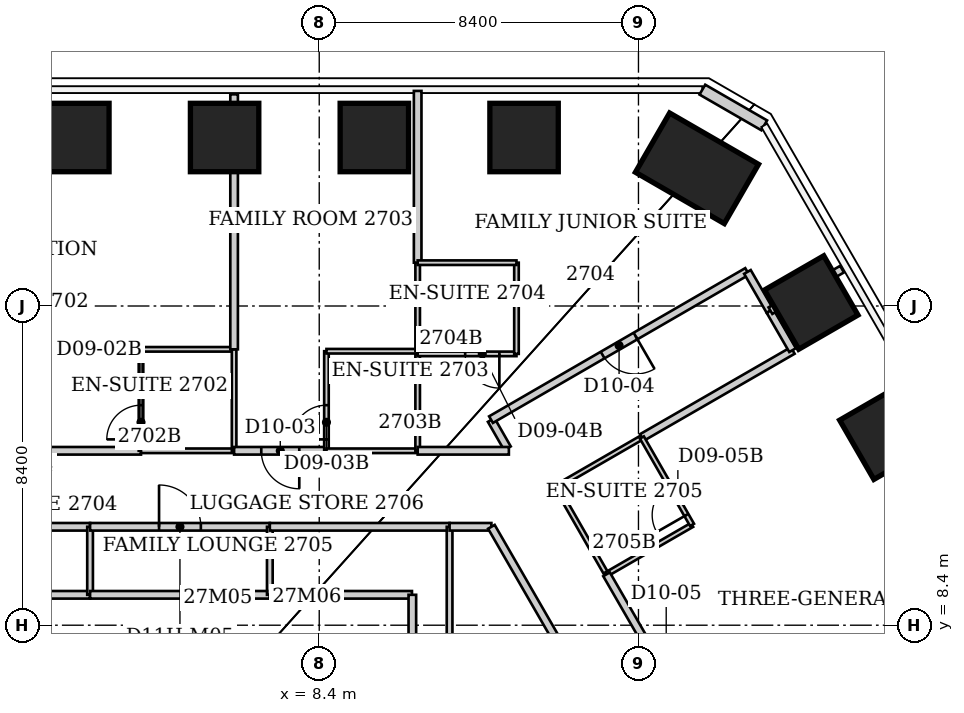
"""IFC4 building model, lengths in metres.
Left out: names, types, materials, properties, quantities, classifications, styles, units other than length and angle.
Written with IfcOpenShell. Run it as: python <this file> out.ifc"""

import sys

from ifc_helpers import new_model, si_unit, direction, frame, frame_2d, origin, origin_2d, place, context, subcontext, project, spatial, rectangle, extrude, element, fill, save


model = new_model("IFC4")
c1 = context("Model", 3, precision=1e-05, world=origin(), true_north=direction((0.0, 1.0)))
c2 = subcontext(c1, "Body", "Model", "MODEL_VIEW")
j1 = project(units=[si_unit("LENGTHUNIT", "METRE"), si_unit("PLANEANGLEUNIT", "RADIAN")], contexts=[c1])
p1 = place(None, origin())
s1 = spatial("IfcSite", under=j1, at=p1, CompositionType="ELEMENT")
p2 = place(p1, origin())
s2 = spatial("IfcBuilding", under=s1, at=p2, CompositionType="ELEMENT")
p3 = place(p2, frame((0.0, 0.0, 112.0)))
s3 = spatial("IfcBuildingStorey", under=s2, at=p3, CompositionType="ELEMENT", Elevation=112.0)
for number, where, z_axis, x_axis in (
    (1, (1.97, 21.234, 0.0), (0.0, 0.0, 1.0), (0.0, 1.0, 0.0)),
    (2, (5.91, 21.234, 0.0), (0.0, 0.0, 1.0), (0.0, 1.0, 0.0)),
    (3, (9.85, 21.234, 0.0), (0.0, 0.0, 1.0), (0.0, 1.0, 0.0)),
    (4, (13.79, 21.234, 0.0), (0.0, 0.0, 1.0), (0.0, 1.0, 0.0)),
):
    element("IfcColumn", number, at=place(p3, frame(where, z_axis=z_axis, x_axis=x_axis)), inside=s3, PredefinedType="COLUMN", context=c2, shape_type="SweptSolid", body=[
        extrude(rectangle(XDim=1.8, YDim=1.8, at=origin_2d()), origin(), (0.0, 0.0, 1.0), 3.8),
    ])
p4 = place(p3, frame((18.339, 20.424, 0.0), z_axis=(0.0, 0.0, 1.0), x_axis=(0.5, 0.866025403784, 0.0)))
e5 = element("IfcColumn", 5, at=p4, inside=s3, PredefinedType="COLUMN", context=c2, shape_type="SweptSolid", body=[
    extrude(rectangle(XDim=1.8, YDim=2.7, at=origin_2d()), origin(), (0.0, 0.0, 1.0), 3.8),
])
for number, where, z_axis, x_axis in (
    (6, (21.346, 16.891, 0.0), (0.0, 0.0, 1.0), (0.866, 0.5, 0.0)),
    (7, (23.324, 13.466, 0.0), (0.0, 0.0, 1.0), (0.866, 0.5, 0.0)),
):
    element("IfcColumn", number, at=place(p3, frame(where, z_axis=z_axis, x_axis=x_axis)), inside=s3, PredefinedType="COLUMN", context=c2, shape_type="SweptSolid", body=[
        extrude(rectangle(XDim=1.8, YDim=1.8, at=origin_2d()), origin(), (0.0, 0.0, 1.0), 3.8),
    ])
p5 = place(p3, frame((18.481, 22.494, 0.0), z_axis=(0.0, 0.0, 1.0), x_axis=(0.865988793993, -0.500063404658, 0.0)))
e8 = element("IfcWall", 8, at=p5, inside=s3, PredefinedType="SOLIDWALL", context=c2, shape_type="SweptSolid", body=[
    extrude(rectangle(XDim=1.88, YDim=0.3, at=frame_2d((0.94, 0.0))), origin(), (0.0, 0.0, 1.0), 3.64),
])
p6 = place(p3, frame((-2.37, 10.99, 0.0), z_axis=(0.0, 0.0, 1.0), x_axis=(1.0, 0.0, 0.0)))
e9 = element("IfcWall", 9, at=p6, inside=s3, PredefinedType="PARTITIONING", context=c2, shape_type="SweptSolid", body=[
    extrude(rectangle(XDim=4.74, YDim=0.2, at=frame_2d((2.37, 0.0))), origin(), (0.0, 0.0, 1.0), 3.64),
])
p7 = place(p6, frame((1.82, 0.0, 0.0)))
e10 = element("IfcOpeningElement", 10, at=p7, cuts=e9, PredefinedType="OPENING", context=c2, shape_type="SweptSolid", body=[
    extrude(rectangle(XDim=1.1, YDim=2.2, at=frame_2d((0.55, 1.1))), frame((0.0, 0.1, 0.0), z_axis=(0.0, -1.0, 0.0), x_axis=(1.0, 0.0, 0.0)), (0.0, 0.0, 1.0), 0.2),
])
p8 = place(p3, frame((2.37, 9.2, 0.0), z_axis=(0.0, 0.0, 1.0), x_axis=(-1.0, 0.0, 0.0)))
e11 = element("IfcWall", 11, at=p8, inside=s3, PredefinedType="PARTITIONING", context=c2, shape_type="SweptSolid", body=[
    extrude(rectangle(XDim=4.74, YDim=0.2, at=frame_2d((2.37, 0.0))), origin(), (0.0, 0.0, 1.0), 3.64),
])
p9 = place(p3, frame((2.37, 10.99, 0.0), z_axis=(0.0, 0.0, 1.0), x_axis=(0.0, -1.0, 0.0)))
e12 = element("IfcWall", 12, at=p9, inside=s3, PredefinedType="PARTITIONING", context=c2, shape_type="SweptSolid", body=[
    extrude(rectangle(XDim=1.79, YDim=0.15, at=frame_2d((0.895, 0.0))), origin(), (0.0, 0.0, 1.0), 3.64),
])
p10 = place(p3, frame((2.37, 10.99, 0.0), z_axis=(0.0, 0.0, 1.0), x_axis=(1.0, 0.0, 0.0)))
e13 = element("IfcWall", 13, at=p10, inside=s3, PredefinedType="PARTITIONING", context=c2, shape_type="SweptSolid", body=[
    extrude(rectangle(XDim=4.73, YDim=0.2, at=frame_2d((2.365, 0.0))), origin(), (0.0, 0.0, 1.0), 3.64),
])
p11 = place(p10, frame((1.815, 0.0, 0.0)))
e14 = element("IfcOpeningElement", 14, at=p11, cuts=e13, PredefinedType="OPENING", context=c2, shape_type="SweptSolid", body=[
    extrude(rectangle(XDim=1.1, YDim=2.2, at=frame_2d((0.55, 1.1))), frame((0.0, 0.1, 0.0), z_axis=(0.0, -1.0, 0.0), x_axis=(1.0, 0.0, 0.0)), (0.0, 0.0, 1.0), 0.2),
])
p12 = place(p3, frame((3.71, 12.99, 0.0), z_axis=(0.0, 0.0, 1.0), x_axis=(-1.0, 0.0, 0.0)))
e15 = element("IfcWall", 15, at=p12, inside=s3, PredefinedType="PARTITIONING", context=c2, shape_type="SweptSolid", body=[
    extrude(rectangle(XDim=8.67, YDim=0.2, at=frame_2d((4.335, 0.0))), origin(), (0.0, 0.0, 1.0), 3.64),
])
p13 = place(p12, frame((3.835, 0.0, 0.0)))
e16 = element("IfcOpeningElement", 16, at=p13, cuts=e15, PredefinedType="OPENING", context=c2, shape_type="SweptSolid", body=[
    extrude(rectangle(XDim=1.0, YDim=2.13, at=frame_2d((0.5, 1.065))), frame((0.0, 0.1, 0.0), z_axis=(0.0, -1.0, 0.0), x_axis=(1.0, 0.0, 0.0)), (0.0, 0.0, 1.0), 0.2),
])
p14 = place(p3, frame((3.71, 15.66, 0.0), z_axis=(0.0, 0.0, 1.0), x_axis=(0.0, -1.0, 0.0)))
e17 = element("IfcWall", 17, at=p14, inside=s3, PredefinedType="PARTITIONING", context=c2, shape_type="SweptSolid", body=[
    extrude(rectangle(XDim=2.67, YDim=0.12, at=frame_2d((1.335, 0.0))), origin(), (0.0, 0.0, 1.0), 3.64),
])
p15 = place(p14, frame((1.47, 0.0, 0.0)))
e18 = element("IfcOpeningElement", 18, at=p15, cuts=e17, PredefinedType="OPENING", context=c2, shape_type="SweptSolid", body=[
    extrude(rectangle(XDim=0.9, YDim=2.03, at=frame_2d((0.45, 1.015))), frame((0.0, 0.06, 0.0), z_axis=(0.0, -1.0, 0.0), x_axis=(1.0, 0.0, 0.0)), (0.0, 0.0, 1.0), 0.12),
])
for number, where, z_axis, x_axis in (
    (19, (6.16, 12.99, 0.0), (0.0, 0.0, 1.0), (-1.0, 0.0, 0.0)),
    (20, (6.16, 15.66, 0.0), (0.0, 0.0, 1.0), (-1.0, 0.0, 0.0)),
):
    element("IfcWall", number, at=place(p3, frame(where, z_axis=z_axis, x_axis=x_axis)), inside=s3, PredefinedType="PARTITIONING", context=c2, shape_type="SweptSolid", body=[
        extrude(rectangle(XDim=2.45, YDim=0.12, at=frame_2d((1.225, 0.0))), origin(), (0.0, 0.0, 1.0), 3.64),
    ])
p16 = place(p3, frame((6.16, 15.66, 0.0), z_axis=(0.0, 0.0, 1.0), x_axis=(0.0, -1.0, 0.0)))
e21 = element("IfcWall", 21, at=p16, inside=s3, PredefinedType="PARTITIONING", context=c2, shape_type="SweptSolid", body=[
    extrude(rectangle(XDim=2.67, YDim=0.12, at=frame_2d((1.335, 0.0))), origin(), (0.0, 0.0, 1.0), 3.64),
])
p17 = place(p3, frame((6.16, 22.37, 0.0), z_axis=(0.0, 0.0, 1.0), x_axis=(0.0, -1.0, 0.0)))
e22 = element("IfcWall", 22, at=p17, inside=s3, PredefinedType="PARTITIONING", context=c2, shape_type="SweptSolid", body=[
    extrude(rectangle(XDim=6.71, YDim=0.2, at=frame_2d((3.355, 0.0))), origin(), (0.0, 0.0, 1.0), 3.64),
])
p18 = place(p3, frame((7.1, 9.2, 0.0), z_axis=(0.0, 0.0, 1.0), x_axis=(-1.0, 0.0, 0.0)))
e23 = element("IfcWall", 23, at=p18, inside=s3, PredefinedType="PARTITIONING", context=c2, shape_type="SweptSolid", body=[
    extrude(rectangle(XDim=4.73, YDim=0.2, at=frame_2d((2.365, 0.0))), origin(), (0.0, 0.0, 1.0), 3.64),
])
p19 = place(p3, frame((7.1, 10.99, 0.0), z_axis=(0.0, 0.0, 1.0), x_axis=(0.0, -1.0, 0.0)))
e24 = element("IfcWall", 24, at=p19, inside=s3, PredefinedType="PARTITIONING", context=c2, shape_type="SweptSolid", body=[
    extrude(rectangle(XDim=1.79, YDim=0.15, at=frame_2d((0.895, 0.0))), origin(), (0.0, 0.0, 1.0), 3.64),
])
p20 = place(p3, frame((7.1, 10.99, 0.0), z_axis=(0.0, 0.0, 1.0), x_axis=(1.0, 0.0, 0.0)))
e25 = element("IfcWall", 25, at=p20, inside=s3, PredefinedType="PARTITIONING", context=c2, shape_type="SweptSolid", body=[
    extrude(rectangle(XDim=4.73, YDim=0.2, at=frame_2d((2.365, 0.0))), origin(), (0.0, 0.0, 1.0), 3.64),
])
p21 = place(p3, frame((8.59, 12.99, 0.0), z_axis=(0.0, 0.0, 1.0), x_axis=(-1.0, 0.0, 0.0)))
e26 = element("IfcWall", 26, at=p21, inside=s3, PredefinedType="PARTITIONING", context=c2, shape_type="SweptSolid", body=[
    extrude(rectangle(XDim=2.43, YDim=0.2, at=frame_2d((1.215, 0.0))), origin(), (0.0, 0.0, 1.0), 3.64),
])
p22 = place(p21, frame((0.715, 0.0, 0.0)))
e27 = element("IfcOpeningElement", 27, at=p22, cuts=e26, PredefinedType="OPENING", context=c2, shape_type="SweptSolid", body=[
    extrude(rectangle(XDim=1.0, YDim=2.13, at=frame_2d((0.5, 1.065))), frame((0.0, 0.1, 0.0), z_axis=(0.0, -1.0, 0.0), x_axis=(1.0, 0.0, 0.0)), (0.0, 0.0, 1.0), 0.2),
])
p23 = place(p3, frame((8.59, 15.61, 0.0), z_axis=(0.0, 0.0, 1.0), x_axis=(0.0, -1.0, 0.0)))
e28 = element("IfcWall", 28, at=p23, inside=s3, PredefinedType="PARTITIONING", context=c2, shape_type="SweptSolid", body=[
    extrude(rectangle(XDim=2.62, YDim=0.12, at=frame_2d((1.31, 0.0))), origin(), (0.0, 0.0, 1.0), 3.64),
])
p24 = place(p23, frame((1.42, 0.0, 0.0)))
e29 = element("IfcOpeningElement", 29, at=p24, cuts=e28, PredefinedType="OPENING", context=c2, shape_type="SweptSolid", body=[
    extrude(rectangle(XDim=0.9, YDim=2.03, at=frame_2d((0.45, 1.015))), frame((0.0, 0.06, 0.0), z_axis=(0.0, -1.0, 0.0), x_axis=(1.0, 0.0, 0.0)), (0.0, 0.0, 1.0), 0.12),
])
p25 = place(p3, frame((10.84, 9.2, 0.0), z_axis=(0.0, 0.0, 1.0), x_axis=(-1.0, 0.0, 0.0)))
e30 = element("IfcWall", 30, at=p25, inside=s3, PredefinedType="PARTITIONING", context=c2, shape_type="SweptSolid", body=[
    extrude(rectangle(XDim=3.74, YDim=0.2, at=frame_2d((1.87, 0.0))), origin(), (0.0, 0.0, 1.0), 3.64),
])
p26 = place(p3, frame((10.85, -5.19, 0.0), z_axis=(0.0, 0.0, 1.0), x_axis=(0.0, 1.0, 0.0)))
e31 = element("IfcWall", 31, at=p26, inside=s3, PredefinedType="PARTITIONING", context=c2, shape_type="SweptSolid", body=[
    extrude(rectangle(XDim=14.39, YDim=0.2, at=frame_2d((7.195, 0.0))), origin(), (0.0, 0.0, 1.0), 3.64),
])
p27 = place(p26, frame((6.645, 0.0, 0.0)))
e32 = element("IfcOpeningElement", 32, at=p27, cuts=e31, PredefinedType="OPENING", context=c2, shape_type="SweptSolid", body=[
    extrude(rectangle(XDim=1.1, YDim=2.2, at=frame_2d((0.55, 1.1))), frame((0.0, 0.1, 0.0), z_axis=(0.0, -1.0, 0.0), x_axis=(1.0, 0.0, 0.0)), (0.0, 0.0, 1.0), 0.2),
])
p28 = place(p3, frame((10.99, 12.99, 0.0), z_axis=(0.0, 0.0, 1.0), x_axis=(-1.0, 0.0, 0.0)))
e33 = element("IfcWall", 33, at=p28, inside=s3, PredefinedType="PARTITIONING", context=c2, shape_type="SweptSolid", body=[
    extrude(rectangle(XDim=2.4, YDim=0.12, at=frame_2d((1.2, 0.0))), origin(), (0.0, 0.0, 1.0), 3.64),
])
p29 = place(p3, frame((10.99, 15.54, 0.0), z_axis=(0.0, 0.0, 1.0), x_axis=(0.0, -1.0, 0.0)))
e34 = element("IfcWall", 34, at=p29, inside=s3, PredefinedType="PARTITIONING", context=c2, shape_type="SweptSolid", body=[
    extrude(rectangle(XDim=2.55, YDim=0.12, at=frame_2d((1.275, 0.0))), origin(), (0.0, 0.0, 1.0), 3.64),
])
p30 = place(p3, frame((10.99, 15.54, 0.0), z_axis=(0.0, 0.0, 1.0), x_axis=(1.0, 0.0, 0.0)))
e35 = element("IfcWall", 35, at=p30, inside=s3, PredefinedType="PARTITIONING", context=c2, shape_type="SweptSolid", body=[
    extrude(rectangle(XDim=2.6, YDim=0.12, at=frame_2d((1.3, 0.0))), origin(), (0.0, 0.0, 1.0), 3.64),
])
p31 = place(p30, frame((1.25, 0.0, 0.0)))
e36 = element("IfcOpeningElement", 36, at=p31, cuts=e35, PredefinedType="OPENING", context=c2, shape_type="SweptSolid", body=[
    extrude(rectangle(XDim=0.9, YDim=2.03, at=frame_2d((0.45, 1.015))), frame((0.0, 0.06, 0.0), z_axis=(0.0, -1.0, 0.0), x_axis=(1.0, 0.0, 0.0)), (0.0, 0.0, 1.0), 0.12),
])
p32 = place(p3, frame((10.99, 15.61, 0.0), z_axis=(0.0, 0.0, 1.0), x_axis=(-1.0, 0.0, 0.0)))
e37 = element("IfcWall", 37, at=p32, inside=s3, PredefinedType="PARTITIONING", context=c2, shape_type="SweptSolid", body=[
    extrude(rectangle(XDim=2.4, YDim=0.12, at=frame_2d((1.2, 0.0))), origin(), (0.0, 0.0, 1.0), 3.64),
])
p33 = place(p3, frame((10.99, 17.94, 0.0), z_axis=(0.0, 0.0, 1.0), x_axis=(0.0, -1.0, 0.0)))
e38 = element("IfcWall", 38, at=p33, inside=s3, PredefinedType="PARTITIONING", context=c2, shape_type="SweptSolid", body=[
    extrude(rectangle(XDim=2.33, YDim=0.12, at=frame_2d((1.165, 0.0))), origin(), (0.0, 0.0, 1.0), 3.64),
])
p34 = place(p3, frame((10.99, 22.46, 0.0), z_axis=(0.0, 0.0, 1.0), x_axis=(0.0, -1.0, 0.0)))
e39 = element("IfcWall", 39, at=p34, inside=s3, PredefinedType="PARTITIONING", context=c2, shape_type="SweptSolid", body=[
    extrude(rectangle(XDim=4.52, YDim=0.2, at=frame_2d((2.26, 0.0))), origin(), (0.0, 0.0, 1.0), 3.64),
])
p35 = place(p3, frame((11.83, 10.99, 0.0), z_axis=(0.0, 0.0, 1.0), x_axis=(0.0, -1.0, 0.0)))
e40 = element("IfcWall", 40, at=p35, inside=s3, PredefinedType="PARTITIONING", context=c2, shape_type="SweptSolid", body=[
    extrude(rectangle(XDim=14.335, YDim=0.15, at=frame_2d((7.167, 0.0))), origin(), (0.0, 0.0, 1.0), 3.64),
])
p36 = place(p3, frame((11.83, 10.99, 0.0), z_axis=(0.0, 0.0, 1.0), x_axis=(1.0, 0.0, 0.0)))
e41 = element("IfcWall", 41, at=p36, inside=s3, PredefinedType="PARTITIONING", context=c2, shape_type="SweptSolid", body=[
    extrude(rectangle(XDim=1.1, YDim=0.2, at=frame_2d((0.55, 0.0))), origin(), (0.0, 0.0, 1.0), 3.64),
])
p37 = place(p3, frame((12.925, 13.801, 0.0), z_axis=(0.0, 0.0, 1.0), x_axis=(0.497361322706, -0.8675434944, 0.0)))
e42 = element("IfcWall", 42, at=p37, inside=s3, PredefinedType="PARTITIONING", context=c2, shape_type="SweptSolid", body=[
    extrude(rectangle(XDim=0.86, YDim=0.2, at=frame_2d((0.43, 0.0))), origin(), (0.0, 0.0, 1.0), 3.64),
])
p38 = place(p3, frame((12.93, 10.99, 0.0), z_axis=(0.0, 0.0, 1.0), x_axis=(0.4998524389, -0.866110581465, 0.0)))
e43 = element("IfcWall", 43, at=p38, inside=s3, PredefinedType="PARTITIONING", context=c2, shape_type="SweptSolid", body=[
    extrude(rectangle(XDim=7.262, YDim=0.2, at=frame_2d((3.631, 0.0))), origin(), (0.0, 0.0, 1.0), 3.64),
])
p39 = place(p3, frame((13.39, 12.99, 0.0), z_axis=(0.0, 0.0, 1.0), x_axis=(-1.0, 0.0, 0.0)))
e44 = element("IfcWall", 44, at=p39, inside=s3, PredefinedType="PARTITIONING", context=c2, shape_type="SweptSolid", body=[
    extrude(rectangle(XDim=2.4, YDim=0.2, at=frame_2d((1.2, 0.0))), origin(), (0.0, 0.0, 1.0), 3.64),
])
p40 = place(p3, frame((13.59, 15.54, 0.0), z_axis=(0.0, 0.0, 1.0), x_axis=(0.0, 1.0, 0.0)))
e45 = element("IfcWall", 45, at=p40, inside=s3, PredefinedType="PARTITIONING", context=c2, shape_type="SweptSolid", body=[
    extrude(rectangle(XDim=2.4, YDim=0.12, at=frame_2d((1.2, 0.0))), origin(), (0.0, 0.0, 1.0), 3.64),
])
p41 = place(p3, frame((13.59, 17.94, 0.0), z_axis=(0.0, 0.0, 1.0), x_axis=(-1.0, 0.0, 0.0)))
e46 = element("IfcWall", 46, at=p41, inside=s3, PredefinedType="PARTITIONING", context=c2, shape_type="SweptSolid", body=[
    extrude(rectangle(XDim=2.6, YDim=0.12, at=frame_2d((1.3, 0.0))), origin(), (0.0, 0.0, 1.0), 3.64),
])
p42 = place(p3, frame((14.64, 12.04, 0.0), z_axis=(0.0, 0.0, 1.0), x_axis=(0.497773911185, -0.867306827682, 0.0)))
e47 = element("IfcWall", 47, at=p42, inside=s3, PredefinedType="PARTITIONING", context=c2, shape_type="SweptSolid", body=[
    extrude(rectangle(XDim=2.652, YDim=0.12, at=frame_2d((1.326, 0.0))), origin(), (0.0, 0.0, 1.0), 3.64),
])
p43 = place(p3, frame((14.64, 12.04, 0.0), z_axis=(0.0, 0.0, 1.0), x_axis=(0.865880446098, 0.50025099007, 0.0)))
e48 = element("IfcWall", 48, at=p43, inside=s3, PredefinedType="PARTITIONING", context=c2, shape_type="SweptSolid", body=[
    extrude(rectangle(XDim=2.599, YDim=0.12, at=frame_2d((1.299, 0.0))), origin(), (0.0, 0.0, 1.0), 3.64),
])
p44 = place(p3, frame((15.96, 9.74, 0.0), z_axis=(0.0, 0.0, 1.0), x_axis=(0.865856933682, 0.500291685314, 0.0)))
e49 = element("IfcWall", 49, at=p44, inside=s3, PredefinedType="PARTITIONING", context=c2, shape_type="SweptSolid", body=[
    extrude(rectangle(XDim=2.599, YDim=0.12, at=frame_2d((1.299, 0.0))), origin(), (0.0, 0.0, 1.0), 3.64),
])
p45 = place(p3, frame((15.96, 9.74, 0.0), z_axis=(0.0, 0.0, 1.0), x_axis=(0.499926574701, -0.86606779175, 0.0)))
e50 = element("IfcWall", 50, at=p45, inside=s3, PredefinedType="PARTITIONING", context=c2, shape_type="SweptSolid", body=[
    extrude(rectangle(XDim=6.281, YDim=0.2, at=frame_2d((3.141, 0.0))), origin(), (0.0, 0.0, 1.0), 3.64),
])
p46 = place(p45, frame((2.641, 0.0, 0.0)))
e51 = element("IfcOpeningElement", 51, at=p46, cuts=e50, PredefinedType="OPENING", context=c2, shape_type="SweptSolid", body=[
    extrude(rectangle(XDim=1.0, YDim=2.13, at=frame_2d((0.5, 1.065))), frame((0.0, 0.1, 0.0), z_axis=(0.0, -1.0, 0.0), x_axis=(1.0, 0.0, 0.0)), (0.0, 0.0, 1.0), 0.2),
])
p47 = place(p3, frame((16.89, 13.34, 0.0), z_axis=(0.0, 0.0, 1.0), x_axis=(0.86623967971, 0.499628679417, 0.0)))
e52 = element("IfcWall", 52, at=p47, inside=s3, PredefinedType="PARTITIONING", context=c2, shape_type="SweptSolid", body=[
    extrude(rectangle(XDim=4.583, YDim=0.2, at=frame_2d((2.292, 0.0))), origin(), (0.0, 0.0, 1.0), 3.64),
])
p48 = place(p3, frame((18.21, 11.04, 0.0), z_axis=(0.0, 0.0, 1.0), x_axis=(-0.497773911185, 0.867306827682, 0.0)))
e53 = element("IfcWall", 53, at=p48, inside=s3, PredefinedType="PARTITIONING", context=c2, shape_type="SweptSolid", body=[
    extrude(rectangle(XDim=2.652, YDim=0.12, at=frame_2d((1.326, 0.0))), origin(), (0.0, 0.0, 1.0), 3.64),
])
p49 = place(p48, frame((0.3, 0.0, 0.0)))
e54 = element("IfcOpeningElement", 54, at=p49, cuts=e53, PredefinedType="OPENING", context=c2, shape_type="SweptSolid", body=[
    extrude(rectangle(XDim=0.9, YDim=2.03, at=frame_2d((0.45, 1.015))), frame((0.0, 0.06, 0.0), z_axis=(0.0, -1.0, 0.0), x_axis=(1.0, 0.0, 0.0)), (0.0, 0.0, 1.0), 0.12),
])
p50 = place(p3, frame((19.66, 17.71, 0.0), z_axis=(0.0, 0.0, 1.0), x_axis=(-0.865548612503, -0.500824918902, 0.0)))
e55 = element("IfcWall", 55, at=p50, inside=s3, PredefinedType="PARTITIONING", context=c2, shape_type="SweptSolid", body=[
    extrude(rectangle(XDim=7.787, YDim=0.2, at=frame_2d((3.894, 0.0))), origin(), (0.0, 0.0, 1.0), 3.64),
])
p51 = place(p50, frame((3.394, 0.0, 0.0)))
e56 = element("IfcOpeningElement", 56, at=p51, cuts=e55, PredefinedType="OPENING", context=c2, shape_type="SweptSolid", body=[
    extrude(rectangle(XDim=1.0, YDim=2.13, at=frame_2d((0.5, 1.065))), frame((0.0, 0.1, 0.0), z_axis=(0.0, -1.0, 0.0), x_axis=(1.0, 0.0, 0.0)), (0.0, 0.0, 1.0), 0.2),
])
p52 = place(p3, frame((19.667, 17.697, 0.0), z_axis=(0.0, 0.0, 1.0), x_axis=(0.499704629046, -0.866195869137, 0.0)))
e57 = element("IfcWall", 57, at=p52, inside=s3, PredefinedType="PARTITIONING", context=c2, shape_type="SweptSolid", body=[
    extrude(rectangle(XDim=1.186, YDim=0.2, at=frame_2d((0.593, 0.0))), origin(), (0.0, 0.0, 1.0), 3.64),
])
p53 = place(p3, frame((20.26, 16.67, 0.0), z_axis=(0.0, 0.0, 1.0), x_axis=(0.499734288277, -0.866178758179, 0.0)))
e58 = element("IfcWall", 58, at=p53, inside=s3, PredefinedType="PARTITIONING", context=c2, shape_type="SweptSolid", body=[
    extrude(rectangle(XDim=1.191, YDim=0.2, at=frame_2d((0.595, 0.0))), origin(), (0.0, 0.0, 1.0), 3.64),
])
p54 = place(p3, frame((22.156, 17.77, 0.0), z_axis=(0.0, 0.0, 1.0), x_axis=(-0.865037029405, -0.501708020425, 0.0)))
e59 = element("IfcWall", 59, at=p54, inside=s3, PredefinedType="PARTITIONING", context=c2, shape_type="SweptSolid", body=[
    extrude(rectangle(XDim=2.177, YDim=0.2, at=frame_2d((1.089, 0.0))), origin(), (0.0, 0.0, 1.0), 3.64),
])
p55 = place(p15, origin())
e60 = element("IfcDoor", 60, at=p55, inside=s3, OperationType="SINGLE_SWING_RIGHT", PredefinedType="DOOR", context=c2, shape_type="SweptSolid", body=[
    extrude(rectangle(XDim=0.9, YDim=2.03, at=frame_2d((0.45, 1.015))), frame((0.0, 0.025, 0.0), z_axis=(0.0, -1.0, 0.0), x_axis=(1.0, 0.0, 0.0)), (0.0, 0.0, 1.0), 0.05),
])
fill(e18, e60)
p56 = place(p22, origin())
e61 = element("IfcDoor", 61, at=p56, inside=s3, OperationType="SINGLE_SWING_LEFT", PredefinedType="DOOR", context=c2, shape_type="SweptSolid", body=[
    extrude(rectangle(XDim=1.0, YDim=2.13, at=frame_2d((0.5, 1.065))), frame((0.0, 0.025, 0.0), z_axis=(0.0, -1.0, 0.0), x_axis=(1.0, 0.0, 0.0)), (0.0, 0.0, 1.0), 0.05),
])
fill(e27, e61)
p57 = place(p24, origin())
e62 = element("IfcDoor", 62, at=p57, inside=s3, OperationType="SINGLE_SWING_RIGHT", PredefinedType="DOOR", context=c2, shape_type="SweptSolid", body=[
    extrude(rectangle(XDim=0.9, YDim=2.03, at=frame_2d((0.45, 1.015))), frame((0.0, 0.025, 0.0), z_axis=(0.0, -1.0, 0.0), x_axis=(1.0, 0.0, 0.0)), (0.0, 0.0, 1.0), 0.05),
])
fill(e29, e62)
p58 = place(p51, origin())
e63 = element("IfcDoor", 63, at=p58, inside=s3, OperationType="SINGLE_SWING_LEFT", PredefinedType="DOOR", context=c2, shape_type="SweptSolid", body=[
    extrude(rectangle(XDim=1.0, YDim=2.13, at=frame_2d((0.5, 1.065))), frame((0.0, 0.025, 0.0), z_axis=(0.0, -1.0, 0.0), x_axis=(1.0, 0.0, 0.0)), (0.0, 0.0, 1.0), 0.05),
])
fill(e56, e63)
p59 = place(p31, origin())
e64 = element("IfcDoor", 64, at=p59, inside=s3, OperationType="SINGLE_SWING_RIGHT", PredefinedType="DOOR", context=c2, shape_type="SweptSolid", body=[
    extrude(rectangle(XDim=0.9, YDim=2.03, at=frame_2d((0.45, 1.015))), frame((0.0, 0.025, 0.0), z_axis=(0.0, -1.0, 0.0), x_axis=(1.0, 0.0, 0.0)), (0.0, 0.0, 1.0), 0.05),
])
fill(e36, e64)
p60 = place(p49, origin())
e65 = element("IfcDoor", 65, at=p60, inside=s3, OperationType="SINGLE_SWING_LEFT", PredefinedType="DOOR", context=c2, shape_type="SweptSolid", body=[
    extrude(rectangle(XDim=0.9, YDim=2.03, at=frame_2d((0.45, 1.015))), frame((0.0, 0.025, 0.0), z_axis=(0.0, -1.0, 0.0), x_axis=(1.0, 0.0, 0.0)), (0.0, 0.0, 1.0), 0.05),
])
fill(e54, e65)
p61 = place(p11, origin())
e66 = element("IfcDoor", 66, at=p61, inside=s3, OperationType="SINGLE_SWING_LEFT", PredefinedType="DOOR", context=c2, shape_type="SweptSolid", body=[
    extrude(rectangle(XDim=1.1, YDim=2.2, at=frame_2d((0.55, 1.1))), frame((0.0, 0.025, 0.0), z_axis=(0.0, -1.0, 0.0), x_axis=(1.0, 0.0, 0.0)), (0.0, 0.0, 1.0), 0.05),
])
fill(e14, e66)
save(model, sys.argv[1])
